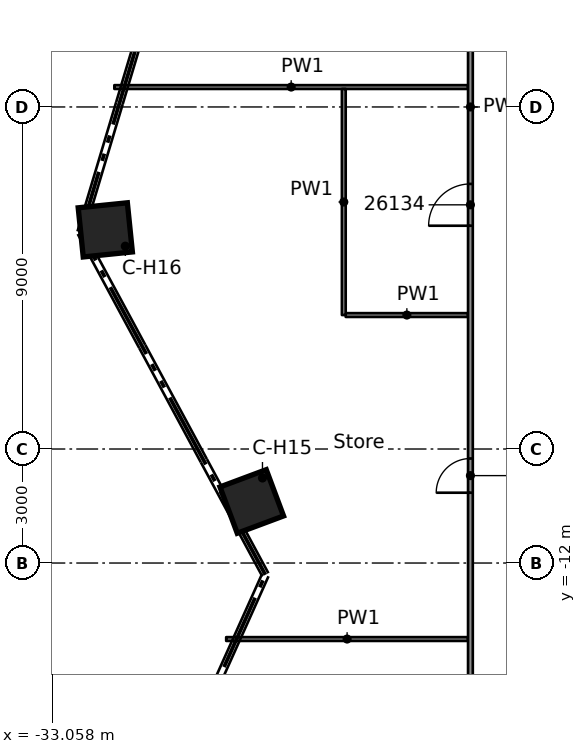
"""IFC4 building model, lengths in metres.
Left out: names, types, materials, properties, quantities, classifications, styles, units other than length and angle.
Written with IfcOpenShell. Run it as: python <this file> out.ifc"""

import sys

from ifc_helpers import new_model, si_unit, direction, frame, frame_2d, origin, origin_2d, place, context, subcontext, project, spatial, rectangle, extrude, element, fill, save


model = new_model("IFC4")
c1 = context("Model", 3, precision=1e-05, world=origin(), true_north=direction((0.0, 1.0)))
c2 = subcontext(c1, "Body", "Model", "MODEL_VIEW")
j1 = project(units=[si_unit("LENGTHUNIT", "METRE"), si_unit("PLANEANGLEUNIT", "RADIAN")], contexts=[c1])
p1 = place(None, origin())
s1 = spatial("IfcSite", under=j1, at=p1, CompositionType="ELEMENT")
p2 = place(p1, origin())
s2 = spatial("IfcBuilding", under=s1, at=p2, CompositionType="ELEMENT")
p3 = place(p2, frame((0.0, 0.0, 134.2)))
s3 = spatial("IfcBuildingStorey", under=s2, at=p3, CompositionType="ELEMENT", Elevation=134.2)
for number, where, z_axis, x_axis in (
    (1, (-27.804, -10.38, 0.0), (0.0, 0.0, 1.0), (-0.937, -0.35, 0.0)),
    (2, (-31.658, -3.234, 0.0), (0.0, 0.0, 1.0), (-0.995, -0.102, 0.0)),
):
    element("IfcColumn", number, at=place(p3, frame(where, z_axis=z_axis, x_axis=x_axis)), inside=s3, PredefinedType="COLUMN", context=c2, shape_type="SweptSolid", body=[
        extrude(rectangle(XDim=1.3, YDim=1.3, at=origin_2d()), origin(), (0.0, 0.0, 1.0), 3.5),
    ])
p4 = place(p3, frame((-28.477, -14.0, 0.0), z_axis=(0.0, 0.0, 1.0), x_axis=(1.0, 0.0, 0.0)))
e3 = element("IfcWall", 3, at=p4, inside=s3, PredefinedType="PARTITIONING", context=c2, shape_type="SweptSolid", body=[
    extrude(rectangle(XDim=6.364, YDim=0.1, at=frame_2d((3.182, 0.0))), origin(), (0.0, 0.0, 1.0), 3.03),
])
p5 = place(p3, frame((-25.332, -5.475, 0.0), z_axis=(0.0, 0.0, 1.0), x_axis=(1.0, 0.0, 0.0)))
e4 = element("IfcWall", 4, at=p5, inside=s3, PredefinedType="PARTITIONING", context=c2, shape_type="SweptSolid", body=[
    extrude(rectangle(XDim=3.219, YDim=0.1, at=frame_2d((1.609, 0.0))), origin(), (0.0, 0.0, 1.0), 3.03),
])
p6 = place(p3, frame((-31.42, 0.524, 0.0), z_axis=(0.0, 0.0, 1.0), x_axis=(1.0, 0.0, 0.0)))
e5 = element("IfcWall", 5, at=p6, inside=s3, PredefinedType="PARTITIONING", context=c2, shape_type="SweptSolid", body=[
    extrude(rectangle(XDim=9.307, YDim=0.1, at=frame_2d((4.653, 0.0))), origin(), (0.0, 0.0, 1.0), 3.03),
])
p7 = place(p3, frame((-22.05, -15.051, 0.0), z_axis=(0.0, 0.0, 1.0), x_axis=(0.0, 1.0, 0.0)))
e6 = element("IfcWall", 6, at=p7, inside=s3, PredefinedType="PARTITIONING", context=c2, shape_type="SweptSolid", body=[
    extrude(rectangle(XDim=30.102, YDim=0.125, at=frame_2d((15.051, 0.0))), origin(), (0.0, 0.0, 1.0), 3.03),
])
p8 = place(p7, frame((4.901, 0.0, 0.0)))
e7 = element("IfcOpeningElement", 7, at=p8, cuts=e6, PredefinedType="OPENING", context=c2, shape_type="SweptSolid", body=[
    extrude(rectangle(XDim=0.9, YDim=2.1, at=frame_2d((0.45, 1.05))), frame((0.0, 0.073, 0.0), z_axis=(0.0, -1.0, 0.0), x_axis=(1.0, 0.0, 0.0)), (0.0, 0.0, 1.0), 0.145),
])
p9 = place(p7, frame((21.925, 0.0, 0.0)))
e8 = element("IfcOpeningElement", 8, at=p9, cuts=e6, PredefinedType="OPENING", context=c2, shape_type="SweptSolid", body=[
    extrude(rectangle(XDim=1.8, YDim=2.1, at=frame_2d((0.9, 1.05))), frame((0.0, 0.073, 0.0), z_axis=(0.0, -1.0, 0.0), x_axis=(1.0, 0.0, 0.0)), (0.0, 0.0, 1.0), 0.145),
])
p10 = place(p7, frame((11.926, 0.0, 0.0)))
e9 = element("IfcOpeningElement", 9, at=p10, cuts=e6, PredefinedType="OPENING", context=c2, shape_type="SweptSolid", body=[
    extrude(rectangle(XDim=1.1, YDim=2.1, at=frame_2d((0.55, 1.05))), frame((0.0, 0.073, 0.0), z_axis=(0.0, -1.0, 0.0), x_axis=(1.0, 0.0, 0.0)), (0.0, 0.0, 1.0), 0.145),
])
p11 = place(p3, frame((-25.382, -5.475, 0.0), z_axis=(0.0, 0.0, 1.0), x_axis=(0.0, 1.0, 0.0)))
e10 = element("IfcWall", 10, at=p11, inside=s3, PredefinedType="PARTITIONING", context=c2, shape_type="SweptSolid", body=[
    extrude(rectangle(XDim=5.949, YDim=0.1, at=frame_2d((2.975, 0.0))), origin(), (0.0, 0.0, 1.0), 3.03),
])
p12 = place(p8, origin())
e11 = element("IfcDoor", 11, at=p12, inside=s3, OperationType="SINGLE_SWING_LEFT", PredefinedType="DOOR", context=c2, shape_type="SweptSolid", body=[
    extrude(rectangle(XDim=0.9, YDim=2.1, at=frame_2d((0.45, 1.05))), frame((0.0, 0.025, 0.0), z_axis=(0.0, -1.0, 0.0), x_axis=(1.0, 0.0, 0.0)), (0.0, 0.0, 1.0), 0.05),
])
fill(e7, e11)
p13 = place(p10, origin())
e12 = element("IfcDoor", 12, at=p13, inside=s3, OperationType="SINGLE_SWING_LEFT", PredefinedType="DOOR", context=c2, shape_type="SweptSolid", body=[
    extrude(rectangle(XDim=1.1, YDim=2.1, at=frame_2d((0.55, 1.05))), frame((0.0, 0.025, 0.0), z_axis=(0.0, -1.0, 0.0), x_axis=(1.0, 0.0, 0.0)), (0.0, 0.0, 1.0), 0.05),
])
fill(e9, e12)
save(model, sys.argv[1])
